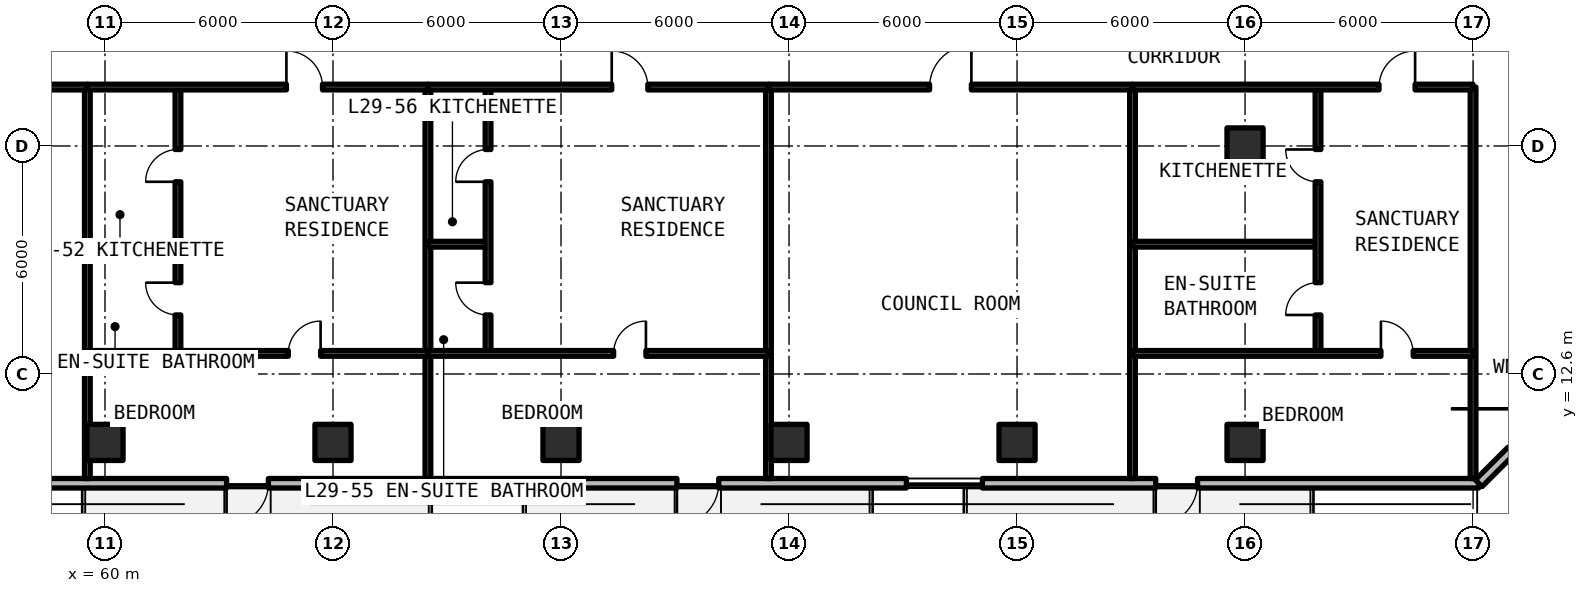
"""IFC4 building model, lengths in metres.
Left out: names, types, materials, properties, quantities, classifications, styles, units other than length and angle.
Written with IfcOpenShell. Run it as: python <this file> out.ifc"""

import sys

from ifc_helpers import new_model, si_unit, direction, frame, frame_2d, origin, origin_2d, place, context, subcontext, project, spatial, rectangle, extrude, element, fill, save


model = new_model("IFC4")
c1 = context("Model", 3, precision=1e-05, world=origin(), true_north=direction((0.0, 1.0)))
c2 = subcontext(c1, "Body", "Model", "MODEL_VIEW")
j1 = project(units=[si_unit("LENGTHUNIT", "METRE"), si_unit("PLANEANGLEUNIT", "RADIAN")], contexts=[c1])
p1 = place(None, origin())
s1 = spatial("IfcSite", under=j1, at=p1, CompositionType="ELEMENT")
p2 = place(p1, origin())
s2 = spatial("IfcBuilding", under=s1, at=p2, CompositionType="ELEMENT")
p3 = place(p2, frame((0.0, 0.0, 105.27)))
s3 = spatial("IfcBuildingStorey", under=s2, at=p3, CompositionType="ELEMENT", Elevation=105.27)
for number, where, z_axis, x_axis in (
    (1, (90.0, 18.6, 0.0), (0.0, 0.0, 1.0), (1.0, 0.0, 0.0)),
    (2, (60.0, 10.8, 0.0), (0.0, 0.0, 1.0), (1.0, 0.0, 0.0)),
    (3, (66.0, 10.8, 0.0), (0.0, 0.0, 1.0), (1.0, 0.0, 0.0)),
    (4, (72.0, 10.8, 0.0), (0.0, 0.0, 1.0), (1.0, 0.0, 0.0)),
    (5, (78.0, 10.8, 0.0), (0.0, 0.0, 1.0), (1.0, 0.0, 0.0)),
    (6, (84.0, 10.8, 0.0), (0.0, 0.0, 1.0), (1.0, 0.0, 0.0)),
    (7, (90.0, 10.8, 0.0), (0.0, 0.0, 1.0), (1.0, 0.0, 0.0)),
):
    element("IfcColumn", number, at=place(p3, frame(where, z_axis=z_axis, x_axis=x_axis)), inside=s3, PredefinedType="COLUMN", context=c2, shape_type="SweptSolid", body=[
        extrude(rectangle(XDim=0.95, YDim=0.95, at=origin_2d()), origin(), (0.0, 0.0, 1.0), 3.3),
    ])
p4 = place(p3, frame((52.125, 9.725, 0.0), z_axis=(0.0, 0.0, 1.0), x_axis=(1.0, 0.0, 0.0)))
e8 = element("IfcWall", 8, at=p4, inside=s3, PredefinedType="SOLIDWALL", context=c2, shape_type="SweptSolid", body=[
    extrude(rectangle(XDim=44.023, YDim=0.25, at=frame_2d((22.012, 0.0))), origin(), (0.0, 0.0, 1.0), 3.08),
])
p5 = place(p4, frame((11.075, 0.0, 0.0)))
e9 = element("IfcOpeningElement", 9, at=p5, cuts=e8, PredefinedType="OPENING", context=c2, shape_type="SweptSolid", body=[
    extrude(rectangle(XDim=1.1, YDim=2.15, at=frame_2d((0.55, 1.075))), frame((0.0, 0.135, 0.0), z_axis=(0.0, -1.0, 0.0), x_axis=(1.0, 0.0, 0.0)), (0.0, 0.0, 1.0), 0.27),
])
p6 = place(p4, frame((22.925, 0.0, 0.0)))
e10 = element("IfcOpeningElement", 10, at=p6, cuts=e8, PredefinedType="OPENING", context=c2, shape_type="SweptSolid", body=[
    extrude(rectangle(XDim=1.1, YDim=2.15, at=frame_2d((0.55, 1.075))), frame((0.0, 0.135, 0.0), z_axis=(0.0, -1.0, 0.0), x_axis=(1.0, 0.0, 0.0)), (0.0, 0.0, 1.0), 0.27),
])
p7 = place(p4, frame((35.525, 0.0, 0.0)))
e11 = element("IfcOpeningElement", 11, at=p7, cuts=e8, PredefinedType="OPENING", context=c2, shape_type="SweptSolid", body=[
    extrude(rectangle(XDim=1.1, YDim=2.15, at=frame_2d((0.55, 1.075))), frame((0.0, 0.135, 0.0), z_axis=(0.0, -1.0, 0.0), x_axis=(1.0, 0.0, 0.0)), (0.0, 0.0, 1.0), 0.27),
])
p8 = place(p4, frame((2.703, 0.0, 0.78)))
e12 = element("IfcOpeningElement", 12, at=p8, cuts=e8, PredefinedType="OPENING", context=c2, shape_type="SweptSolid", body=[
    extrude(rectangle(XDim=2.0, YDim=1.66, at=frame_2d((1.0, 0.83))), frame((0.0, 0.135, 0.0), z_axis=(0.0, -1.0, 0.0), x_axis=(1.0, 0.0, 0.0)), (0.0, 0.0, 1.0), 0.27),
])
p9 = place(p4, frame((28.964, 0.0, 0.78)))
e13 = element("IfcOpeningElement", 13, at=p9, cuts=e8, PredefinedType="OPENING", context=c2, shape_type="SweptSolid", body=[
    extrude(rectangle(XDim=2.0, YDim=1.66, at=frame_2d((1.0, 0.83))), frame((0.0, 0.135, 0.0), z_axis=(0.0, -1.0, 0.0), x_axis=(1.0, 0.0, 0.0)), (0.0, 0.0, 1.0), 0.27),
])
p10 = place(p3, frame((96.148, 9.725, 0.0), z_axis=(0.0, 0.0, 1.0), x_axis=(0.707106781187, 0.707106781187, 0.0)))
e14 = element("IfcWall", 14, at=p10, inside=s3, PredefinedType="SOLIDWALL", context=c2, shape_type="SweptSolid", body=[
    extrude(rectangle(XDim=5.836, YDim=0.25, at=frame_2d((2.918, 0.0))), origin(), (0.0, 0.0, 1.0), 3.08),
])
p11 = place(p10, frame((1.218, 0.0, 0.78)))
e15 = element("IfcOpeningElement", 15, at=p11, cuts=e14, PredefinedType="OPENING", context=c2, shape_type="SweptSolid", body=[
    extrude(rectangle(XDim=3.4, YDim=1.66, at=frame_2d((1.7, 0.83))), frame((0.0, 0.135, 0.0), z_axis=(0.0, -1.0, 0.0), x_axis=(1.0, 0.0, 0.0)), (0.0, 0.0, 1.0), 0.27),
])
for number, where, z_axis, x_axis in (
    (16, (96.0, 9.85, 0.0), (0.0, 0.0, 1.0), (0.0, 1.0, 0.0)),
    (17, (59.536, 9.85, 0.0), (0.0, 0.0, 1.0), (0.0, 1.0, 0.0)),
):
    element("IfcWall", number, at=place(p3, frame(where, z_axis=z_axis, x_axis=x_axis)), inside=s3, PredefinedType="SOLIDWALL", context=c2, shape_type="SweptSolid", body=[
        extrude(rectangle(XDim=10.3, YDim=0.15, at=frame_2d((5.15, 0.0))), origin(), (0.0, 0.0, 1.0), 2.35),
    ])
p12 = place(p3, frame((52.12, 20.15, 0.0), z_axis=(0.0, 0.0, 1.0), x_axis=(1.0, 0.0, 0.0)))
e18 = element("IfcWall", 18, at=p12, inside=s3, PredefinedType="SOLIDWALL", context=c2, shape_type="SweptSolid", body=[
    extrude(rectangle(XDim=7.416, YDim=0.15, at=frame_2d((3.708, 0.0))), origin(), (0.0, 0.0, 1.0), 2.35),
])
p13 = place(p12, frame((3.233, 0.0, 0.0)))
e19 = element("IfcOpeningElement", 19, at=p13, cuts=e18, PredefinedType="OPENING", context=c2, shape_type="SweptSolid", body=[
    extrude(rectangle(XDim=0.95, YDim=2.15, at=frame_2d((0.475, 1.075))), frame((0.0, 0.085, 0.0), z_axis=(0.0, -1.0, 0.0), x_axis=(1.0, 0.0, 0.0)), (0.0, 0.0, 1.0), 0.17),
])
p14 = place(p3, frame((68.498, 9.85, 0.0), z_axis=(0.0, 0.0, 1.0), x_axis=(0.0, 1.0, 0.0)))
e20 = element("IfcWall", 20, at=p14, inside=s3, PredefinedType="SOLIDWALL", context=c2, shape_type="SweptSolid", body=[
    extrude(rectangle(XDim=10.3, YDim=0.15, at=frame_2d((5.15, 0.0))), origin(), (0.0, 0.0, 1.0), 2.35),
])
p15 = place(p3, frame((59.536, 16.015, 0.0), z_axis=(0.0, 0.0, 1.0), x_axis=(1.0, 0.0, 0.0)))
e21 = element("IfcWall", 21, at=p15, inside=s3, PredefinedType="PARTITIONING", context=c2, shape_type="SweptSolid", body=[
    extrude(rectangle(XDim=2.384, YDim=0.15, at=frame_2d((1.192, 0.0))), origin(), (0.0, 0.0, 1.0), 2.35),
])
p16 = place(p3, frame((61.92, 13.142, 0.0), z_axis=(0.0, 0.0, 1.0), x_axis=(0.0, 1.0, 0.0)))
e22 = element("IfcWall", 22, at=p16, inside=s3, PredefinedType="PARTITIONING", context=c2, shape_type="SweptSolid", body=[
    extrude(rectangle(XDim=7.008, YDim=0.15, at=frame_2d((3.504, 0.0))), origin(), (0.0, 0.0, 1.0), 2.35),
])
p17 = place(p16, frame((1.012, 0.0, 0.0)))
e23 = element("IfcOpeningElement", 23, at=p17, cuts=e22, PredefinedType="OPENING", context=c2, shape_type="SweptSolid", body=[
    extrude(rectangle(XDim=0.85, YDim=2.1, at=frame_2d((0.425, 1.05))), frame((0.0, 0.085, 0.0), z_axis=(0.0, -1.0, 0.0), x_axis=(1.0, 0.0, 0.0)), (0.0, 0.0, 1.0), 0.17),
])
p18 = place(p16, frame((4.516, 0.0, 0.0)))
e24 = element("IfcOpeningElement", 24, at=p18, cuts=e22, PredefinedType="OPENING", context=c2, shape_type="SweptSolid", body=[
    extrude(rectangle(XDim=0.85, YDim=2.1, at=frame_2d((0.425, 1.05))), frame((0.0, 0.085, 0.0), z_axis=(0.0, -1.0, 0.0), x_axis=(1.0, 0.0, 0.0)), (0.0, 0.0, 1.0), 0.17),
])
p19 = place(p3, frame((59.536, 13.142, 0.0), z_axis=(0.0, 0.0, 1.0), x_axis=(1.0, 0.0, 0.0)))
e25 = element("IfcWall", 25, at=p19, inside=s3, PredefinedType="PARTITIONING", context=c2, shape_type="SweptSolid", body=[
    extrude(rectangle(XDim=8.961, YDim=0.15, at=frame_2d((4.481, 0.0))), origin(), (0.0, 0.0, 1.0), 2.35),
])
p20 = place(p19, frame((5.288, 0.0, 0.0)))
e26 = element("IfcOpeningElement", 26, at=p20, cuts=e25, PredefinedType="OPENING", context=c2, shape_type="SweptSolid", body=[
    extrude(rectangle(XDim=0.85, YDim=2.1, at=frame_2d((0.425, 1.05))), frame((0.0, 0.085, 0.0), z_axis=(0.0, -1.0, 0.0), x_axis=(1.0, 0.0, 0.0)), (0.0, 0.0, 1.0), 0.17),
])
p21 = place(p3, frame((59.536, 20.15, 0.0), z_axis=(0.0, 0.0, 1.0), x_axis=(1.0, 0.0, 0.0)))
e27 = element("IfcWall", 27, at=p21, inside=s3, PredefinedType="SOLIDWALL", context=c2, shape_type="SweptSolid", body=[
    extrude(rectangle(XDim=8.961, YDim=0.15, at=frame_2d((4.481, 0.0))), origin(), (0.0, 0.0, 1.0), 2.35),
])
p22 = place(p21, frame((5.238, 0.0, 0.0)))
e28 = element("IfcOpeningElement", 28, at=p22, cuts=e27, PredefinedType="OPENING", context=c2, shape_type="SweptSolid", body=[
    extrude(rectangle(XDim=0.95, YDim=2.15, at=frame_2d((0.475, 1.075))), frame((0.0, 0.085, 0.0), z_axis=(0.0, -1.0, 0.0), x_axis=(1.0, 0.0, 0.0)), (0.0, 0.0, 1.0), 0.17),
])
p23 = place(p3, frame((77.459, 9.85, 0.0), z_axis=(0.0, 0.0, 1.0), x_axis=(0.0, 1.0, 0.0)))
e29 = element("IfcWall", 29, at=p23, inside=s3, PredefinedType="SOLIDWALL", context=c2, shape_type="SweptSolid", body=[
    extrude(rectangle(XDim=10.3, YDim=0.15, at=frame_2d((5.15, 0.0))), origin(), (0.0, 0.0, 1.0), 2.35),
])
p24 = place(p3, frame((68.498, 16.015, 0.0), z_axis=(0.0, 0.0, 1.0), x_axis=(1.0, 0.0, 0.0)))
e30 = element("IfcWall", 30, at=p24, inside=s3, PredefinedType="PARTITIONING", context=c2, shape_type="SweptSolid", body=[
    extrude(rectangle(XDim=1.582, YDim=0.15, at=frame_2d((0.791, 0.0))), origin(), (0.0, 0.0, 1.0), 2.35),
])
p25 = place(p3, frame((70.08, 13.142, 0.0), z_axis=(0.0, 0.0, 1.0), x_axis=(0.0, 1.0, 0.0)))
e31 = element("IfcWall", 31, at=p25, inside=s3, PredefinedType="PARTITIONING", context=c2, shape_type="SweptSolid", body=[
    extrude(rectangle(XDim=7.008, YDim=0.15, at=frame_2d((3.504, 0.0))), origin(), (0.0, 0.0, 1.0), 2.35),
])
p26 = place(p25, frame((1.012, 0.0, 0.0)))
e32 = element("IfcOpeningElement", 32, at=p26, cuts=e31, PredefinedType="OPENING", context=c2, shape_type="SweptSolid", body=[
    extrude(rectangle(XDim=0.85, YDim=2.1, at=frame_2d((0.425, 1.05))), frame((0.0, 0.085, 0.0), z_axis=(0.0, -1.0, 0.0), x_axis=(1.0, 0.0, 0.0)), (0.0, 0.0, 1.0), 0.17),
])
p27 = place(p25, frame((4.516, 0.0, 0.0)))
e33 = element("IfcOpeningElement", 33, at=p27, cuts=e31, PredefinedType="OPENING", context=c2, shape_type="SweptSolid", body=[
    extrude(rectangle(XDim=0.85, YDim=2.1, at=frame_2d((0.425, 1.05))), frame((0.0, 0.085, 0.0), z_axis=(0.0, -1.0, 0.0), x_axis=(1.0, 0.0, 0.0)), (0.0, 0.0, 1.0), 0.17),
])
p28 = place(p3, frame((68.498, 13.142, 0.0), z_axis=(0.0, 0.0, 1.0), x_axis=(1.0, 0.0, 0.0)))
e34 = element("IfcWall", 34, at=p28, inside=s3, PredefinedType="PARTITIONING", context=c2, shape_type="SweptSolid", body=[
    extrude(rectangle(XDim=8.961, YDim=0.15, at=frame_2d((4.48, 0.0))), origin(), (0.0, 0.0, 1.0), 2.35),
])
p29 = place(p28, frame((4.887, 0.0, 0.0)))
e35 = element("IfcOpeningElement", 35, at=p29, cuts=e34, PredefinedType="OPENING", context=c2, shape_type="SweptSolid", body=[
    extrude(rectangle(XDim=0.85, YDim=2.1, at=frame_2d((0.425, 1.05))), frame((0.0, 0.085, 0.0), z_axis=(0.0, -1.0, 0.0), x_axis=(1.0, 0.0, 0.0)), (0.0, 0.0, 1.0), 0.17),
])
p30 = place(p3, frame((68.498, 20.15, 0.0), z_axis=(0.0, 0.0, 1.0), x_axis=(1.0, 0.0, 0.0)))
e36 = element("IfcWall", 36, at=p30, inside=s3, PredefinedType="SOLIDWALL", context=c2, shape_type="SweptSolid", body=[
    extrude(rectangle(XDim=8.961, YDim=0.15, at=frame_2d((4.48, 0.0))), origin(), (0.0, 0.0, 1.0), 2.35),
])
p31 = place(p30, frame((4.837, 0.0, 0.0)))
e37 = element("IfcOpeningElement", 37, at=p31, cuts=e36, PredefinedType="OPENING", context=c2, shape_type="SweptSolid", body=[
    extrude(rectangle(XDim=0.95, YDim=2.15, at=frame_2d((0.475, 1.075))), frame((0.0, 0.085, 0.0), z_axis=(0.0, -1.0, 0.0), x_axis=(1.0, 0.0, 0.0)), (0.0, 0.0, 1.0), 0.17),
])
p32 = place(p3, frame((87.039, 9.85, 0.0), z_axis=(0.0, 0.0, 1.0), x_axis=(0.0, 1.0, 0.0)))
e38 = element("IfcWall", 38, at=p32, inside=s3, PredefinedType="SOLIDWALL", context=c2, shape_type="SweptSolid", body=[
    extrude(rectangle(XDim=10.3, YDim=0.15, at=frame_2d((5.15, 0.0))), origin(), (0.0, 0.0, 1.0), 2.35),
])
p33 = place(p3, frame((77.459, 20.15, 0.0), z_axis=(0.0, 0.0, 1.0), x_axis=(1.0, 0.0, 0.0)))
e39 = element("IfcWall", 39, at=p33, inside=s3, PredefinedType="SOLIDWALL", context=c2, shape_type="SweptSolid", body=[
    extrude(rectangle(XDim=9.58, YDim=0.15, at=frame_2d((4.79, 0.0))), origin(), (0.0, 0.0, 1.0), 2.35),
])
p34 = place(p33, frame((4.24, 0.0, 0.0)))
e40 = element("IfcOpeningElement", 40, at=p34, cuts=e39, PredefinedType="OPENING", context=c2, shape_type="SweptSolid", body=[
    extrude(rectangle(XDim=1.1, YDim=2.15, at=frame_2d((0.55, 1.075))), frame((0.0, 0.085, 0.0), z_axis=(0.0, -1.0, 0.0), x_axis=(1.0, 0.0, 0.0)), (0.0, 0.0, 1.0), 0.17),
])
p35 = place(p3, frame((87.039, 16.015, 0.0), z_axis=(0.0, 0.0, 1.0), x_axis=(1.0, 0.0, 0.0)))
e41 = element("IfcWall", 41, at=p35, inside=s3, PredefinedType="PARTITIONING", context=c2, shape_type="SweptSolid", body=[
    extrude(rectangle(XDim=4.881, YDim=0.15, at=frame_2d((2.441, 0.0))), origin(), (0.0, 0.0, 1.0), 2.35),
])
p36 = place(p3, frame((91.92, 13.142, 0.0), z_axis=(0.0, 0.0, 1.0), x_axis=(0.0, 1.0, 0.0)))
e42 = element("IfcWall", 42, at=p36, inside=s3, PredefinedType="PARTITIONING", context=c2, shape_type="SweptSolid", body=[
    extrude(rectangle(XDim=7.008, YDim=0.15, at=frame_2d((3.504, 0.0))), origin(), (0.0, 0.0, 1.0), 2.35),
])
p37 = place(p36, frame((1.012, 0.0, 0.0)))
e43 = element("IfcOpeningElement", 43, at=p37, cuts=e42, PredefinedType="OPENING", context=c2, shape_type="SweptSolid", body=[
    extrude(rectangle(XDim=0.85, YDim=2.1, at=frame_2d((0.425, 1.05))), frame((0.0, 0.085, 0.0), z_axis=(0.0, -1.0, 0.0), x_axis=(1.0, 0.0, 0.0)), (0.0, 0.0, 1.0), 0.17),
])
p38 = place(p36, frame((4.516, 0.0, 0.0)))
e44 = element("IfcOpeningElement", 44, at=p38, cuts=e42, PredefinedType="OPENING", context=c2, shape_type="SweptSolid", body=[
    extrude(rectangle(XDim=0.85, YDim=2.1, at=frame_2d((0.425, 1.05))), frame((0.0, 0.085, 0.0), z_axis=(0.0, -1.0, 0.0), x_axis=(1.0, 0.0, 0.0)), (0.0, 0.0, 1.0), 0.17),
])
p39 = place(p3, frame((87.039, 13.142, 0.0), z_axis=(0.0, 0.0, 1.0), x_axis=(1.0, 0.0, 0.0)))
e45 = element("IfcWall", 45, at=p39, inside=s3, PredefinedType="PARTITIONING", context=c2, shape_type="SweptSolid", body=[
    extrude(rectangle(XDim=8.961, YDim=0.15, at=frame_2d((4.481, 0.0))), origin(), (0.0, 0.0, 1.0), 2.35),
])
p40 = place(p39, frame((6.537, 0.0, 0.0)))
e46 = element("IfcOpeningElement", 46, at=p40, cuts=e45, PredefinedType="OPENING", context=c2, shape_type="SweptSolid", body=[
    extrude(rectangle(XDim=0.85, YDim=2.1, at=frame_2d((0.425, 1.05))), frame((0.0, 0.085, 0.0), z_axis=(0.0, -1.0, 0.0), x_axis=(1.0, 0.0, 0.0)), (0.0, 0.0, 1.0), 0.17),
])
p41 = place(p3, frame((87.039, 20.15, 0.0), z_axis=(0.0, 0.0, 1.0), x_axis=(1.0, 0.0, 0.0)))
e47 = element("IfcWall", 47, at=p41, inside=s3, PredefinedType="SOLIDWALL", context=c2, shape_type="SweptSolid", body=[
    extrude(rectangle(XDim=8.961, YDim=0.15, at=frame_2d((4.481, 0.0))), origin(), (0.0, 0.0, 1.0), 2.35),
])
p42 = place(p41, frame((6.487, 0.0, 0.0)))
e48 = element("IfcOpeningElement", 48, at=p42, cuts=e47, PredefinedType="OPENING", context=c2, shape_type="SweptSolid", body=[
    extrude(rectangle(XDim=0.95, YDim=2.15, at=frame_2d((0.475, 1.075))), frame((0.0, 0.085, 0.0), z_axis=(0.0, -1.0, 0.0), x_axis=(1.0, 0.0, 0.0)), (0.0, 0.0, 1.0), 0.17),
])
p43 = place(p5, frame((1.1, 0.0, 0.0), z_axis=(0.0, 0.0, 1.0), x_axis=(-1.0, 0.0, 0.0)))
e49 = element("IfcDoor", 49, at=p43, inside=s3, OperationType="SINGLE_SWING_LEFT", PredefinedType="DOOR", context=c2, shape_type="SweptSolid", body=[
    extrude(rectangle(XDim=1.1, YDim=2.15, at=frame_2d((0.55, 1.075))), frame((0.0, 0.025, 0.0), z_axis=(0.0, -1.0, 0.0), x_axis=(1.0, 0.0, 0.0)), (0.0, 0.0, 1.0), 0.05),
])
fill(e9, e49)
p44 = place(p6, frame((1.1, 0.0, 0.0), z_axis=(0.0, 0.0, 1.0), x_axis=(-1.0, 0.0, 0.0)))
e50 = element("IfcDoor", 50, at=p44, inside=s3, OperationType="SINGLE_SWING_RIGHT", PredefinedType="DOOR", context=c2, shape_type="SweptSolid", body=[
    extrude(rectangle(XDim=1.1, YDim=2.15, at=frame_2d((0.55, 1.075))), frame((0.0, 0.025, 0.0), z_axis=(0.0, -1.0, 0.0), x_axis=(1.0, 0.0, 0.0)), (0.0, 0.0, 1.0), 0.05),
])
fill(e10, e50)
p45 = place(p7, frame((1.1, 0.0, 0.0), z_axis=(0.0, 0.0, 1.0), x_axis=(-1.0, 0.0, 0.0)))
e51 = element("IfcDoor", 51, at=p45, inside=s3, OperationType="SINGLE_SWING_LEFT", PredefinedType="DOOR", context=c2, shape_type="SweptSolid", body=[
    extrude(rectangle(XDim=1.1, YDim=2.15, at=frame_2d((0.55, 1.075))), frame((0.0, 0.025, 0.0), z_axis=(0.0, -1.0, 0.0), x_axis=(1.0, 0.0, 0.0)), (0.0, 0.0, 1.0), 0.05),
])
fill(e11, e51)
p46 = place(p9, origin())
e52 = element("IfcWindow", 52, at=p46, inside=s3, PartitioningType="SINGLE_PANEL", PredefinedType="WINDOW", context=c2, shape_type="SweptSolid", body=[
    extrude(rectangle(XDim=2.0, YDim=1.66, at=frame_2d((1.0, 0.83))), frame((0.0, 0.03, 0.0), z_axis=(0.0, -1.0, 0.0), x_axis=(1.0, 0.0, 0.0)), (0.0, 0.0, 1.0), 0.06),
])
fill(e13, e52)
p47 = place(p17, origin())
e53 = element("IfcDoor", 53, at=p47, inside=s3, OperationType="SINGLE_SWING_RIGHT", PredefinedType="DOOR", context=c2, shape_type="SweptSolid", body=[
    extrude(rectangle(XDim=0.85, YDim=2.1, at=frame_2d((0.425, 1.05))), frame((0.0, 0.025, 0.0), z_axis=(0.0, -1.0, 0.0), x_axis=(1.0, 0.0, 0.0)), (0.0, 0.0, 1.0), 0.05),
])
fill(e23, e53)
p48 = place(p18, origin())
e54 = element("IfcDoor", 54, at=p48, inside=s3, OperationType="SINGLE_SWING_LEFT", PredefinedType="DOOR", context=c2, shape_type="SweptSolid", body=[
    extrude(rectangle(XDim=0.85, YDim=2.1, at=frame_2d((0.425, 1.05))), frame((0.0, 0.025, 0.0), z_axis=(0.0, -1.0, 0.0), x_axis=(1.0, 0.0, 0.0)), (0.0, 0.0, 1.0), 0.05),
])
fill(e24, e54)
p49 = place(p20, origin())
e55 = element("IfcDoor", 55, at=p49, inside=s3, OperationType="SINGLE_SWING_RIGHT", PredefinedType="DOOR", context=c2, shape_type="SweptSolid", body=[
    extrude(rectangle(XDim=0.85, YDim=2.1, at=frame_2d((0.425, 1.05))), frame((0.0, 0.025, 0.0), z_axis=(0.0, -1.0, 0.0), x_axis=(1.0, 0.0, 0.0)), (0.0, 0.0, 1.0), 0.05),
])
fill(e26, e55)
p50 = place(p22, origin())
e56 = element("IfcDoor", 56, at=p50, inside=s3, OperationType="SINGLE_SWING_LEFT", PredefinedType="DOOR", context=c2, shape_type="SweptSolid", body=[
    extrude(rectangle(XDim=0.95, YDim=2.15, at=frame_2d((0.475, 1.075))), frame((0.0, 0.025, 0.0), z_axis=(0.0, -1.0, 0.0), x_axis=(1.0, 0.0, 0.0)), (0.0, 0.0, 1.0), 0.05),
])
fill(e28, e56)
p51 = place(p26, origin())
e57 = element("IfcDoor", 57, at=p51, inside=s3, OperationType="SINGLE_SWING_RIGHT", PredefinedType="DOOR", context=c2, shape_type="SweptSolid", body=[
    extrude(rectangle(XDim=0.85, YDim=2.1, at=frame_2d((0.425, 1.05))), frame((0.0, 0.025, 0.0), z_axis=(0.0, -1.0, 0.0), x_axis=(1.0, 0.0, 0.0)), (0.0, 0.0, 1.0), 0.05),
])
fill(e32, e57)
p52 = place(p27, origin())
e58 = element("IfcDoor", 58, at=p52, inside=s3, OperationType="SINGLE_SWING_LEFT", PredefinedType="DOOR", context=c2, shape_type="SweptSolid", body=[
    extrude(rectangle(XDim=0.85, YDim=2.1, at=frame_2d((0.425, 1.05))), frame((0.0, 0.025, 0.0), z_axis=(0.0, -1.0, 0.0), x_axis=(1.0, 0.0, 0.0)), (0.0, 0.0, 1.0), 0.05),
])
fill(e33, e58)
p53 = place(p29, origin())
e59 = element("IfcDoor", 59, at=p53, inside=s3, OperationType="SINGLE_SWING_RIGHT", PredefinedType="DOOR", context=c2, shape_type="SweptSolid", body=[
    extrude(rectangle(XDim=0.85, YDim=2.1, at=frame_2d((0.425, 1.05))), frame((0.0, 0.025, 0.0), z_axis=(0.0, -1.0, 0.0), x_axis=(1.0, 0.0, 0.0)), (0.0, 0.0, 1.0), 0.05),
])
fill(e35, e59)
p54 = place(p31, origin())
e60 = element("IfcDoor", 60, at=p54, inside=s3, OperationType="SINGLE_SWING_LEFT", PredefinedType="DOOR", context=c2, shape_type="SweptSolid", body=[
    extrude(rectangle(XDim=0.95, YDim=2.15, at=frame_2d((0.475, 1.075))), frame((0.0, 0.025, 0.0), z_axis=(0.0, -1.0, 0.0), x_axis=(1.0, 0.0, 0.0)), (0.0, 0.0, 1.0), 0.05),
])
fill(e37, e60)
p55 = place(p34, origin())
e61 = element("IfcDoor", 61, at=p55, inside=s3, OperationType="SINGLE_SWING_RIGHT", PredefinedType="DOOR", context=c2, shape_type="SweptSolid", body=[
    extrude(rectangle(XDim=1.1, YDim=2.15, at=frame_2d((0.55, 1.075))), frame((0.0, 0.025, 0.0), z_axis=(0.0, -1.0, 0.0), x_axis=(1.0, 0.0, 0.0)), (0.0, 0.0, 1.0), 0.05),
])
fill(e40, e61)
p56 = place(p37, origin())
e62 = element("IfcDoor", 62, at=p56, inside=s3, OperationType="SINGLE_SWING_LEFT", PredefinedType="DOOR", context=c2, shape_type="SweptSolid", body=[
    extrude(rectangle(XDim=0.85, YDim=2.1, at=frame_2d((0.425, 1.05))), frame((0.0, 0.025, 0.0), z_axis=(0.0, -1.0, 0.0), x_axis=(1.0, 0.0, 0.0)), (0.0, 0.0, 1.0), 0.05),
])
fill(e43, e62)
p57 = place(p38, origin())
e63 = element("IfcDoor", 63, at=p57, inside=s3, OperationType="SINGLE_SWING_RIGHT", PredefinedType="DOOR", context=c2, shape_type="SweptSolid", body=[
    extrude(rectangle(XDim=0.85, YDim=2.1, at=frame_2d((0.425, 1.05))), frame((0.0, 0.025, 0.0), z_axis=(0.0, -1.0, 0.0), x_axis=(1.0, 0.0, 0.0)), (0.0, 0.0, 1.0), 0.05),
])
fill(e44, e63)
p58 = place(p40, origin())
e64 = element("IfcDoor", 64, at=p58, inside=s3, OperationType="SINGLE_SWING_LEFT", PredefinedType="DOOR", context=c2, shape_type="SweptSolid", body=[
    extrude(rectangle(XDim=0.85, YDim=2.1, at=frame_2d((0.425, 1.05))), frame((0.0, 0.025, 0.0), z_axis=(0.0, -1.0, 0.0), x_axis=(1.0, 0.0, 0.0)), (0.0, 0.0, 1.0), 0.05),
])
fill(e46, e64)
p59 = place(p42, origin())
e65 = element("IfcDoor", 65, at=p59, inside=s3, OperationType="SINGLE_SWING_RIGHT", PredefinedType="DOOR", context=c2, shape_type="SweptSolid", body=[
    extrude(rectangle(XDim=0.95, YDim=2.15, at=frame_2d((0.475, 1.075))), frame((0.0, 0.025, 0.0), z_axis=(0.0, -1.0, 0.0), x_axis=(1.0, 0.0, 0.0)), (0.0, 0.0, 1.0), 0.05),
])
fill(e48, e65)
save(model, sys.argv[1])
